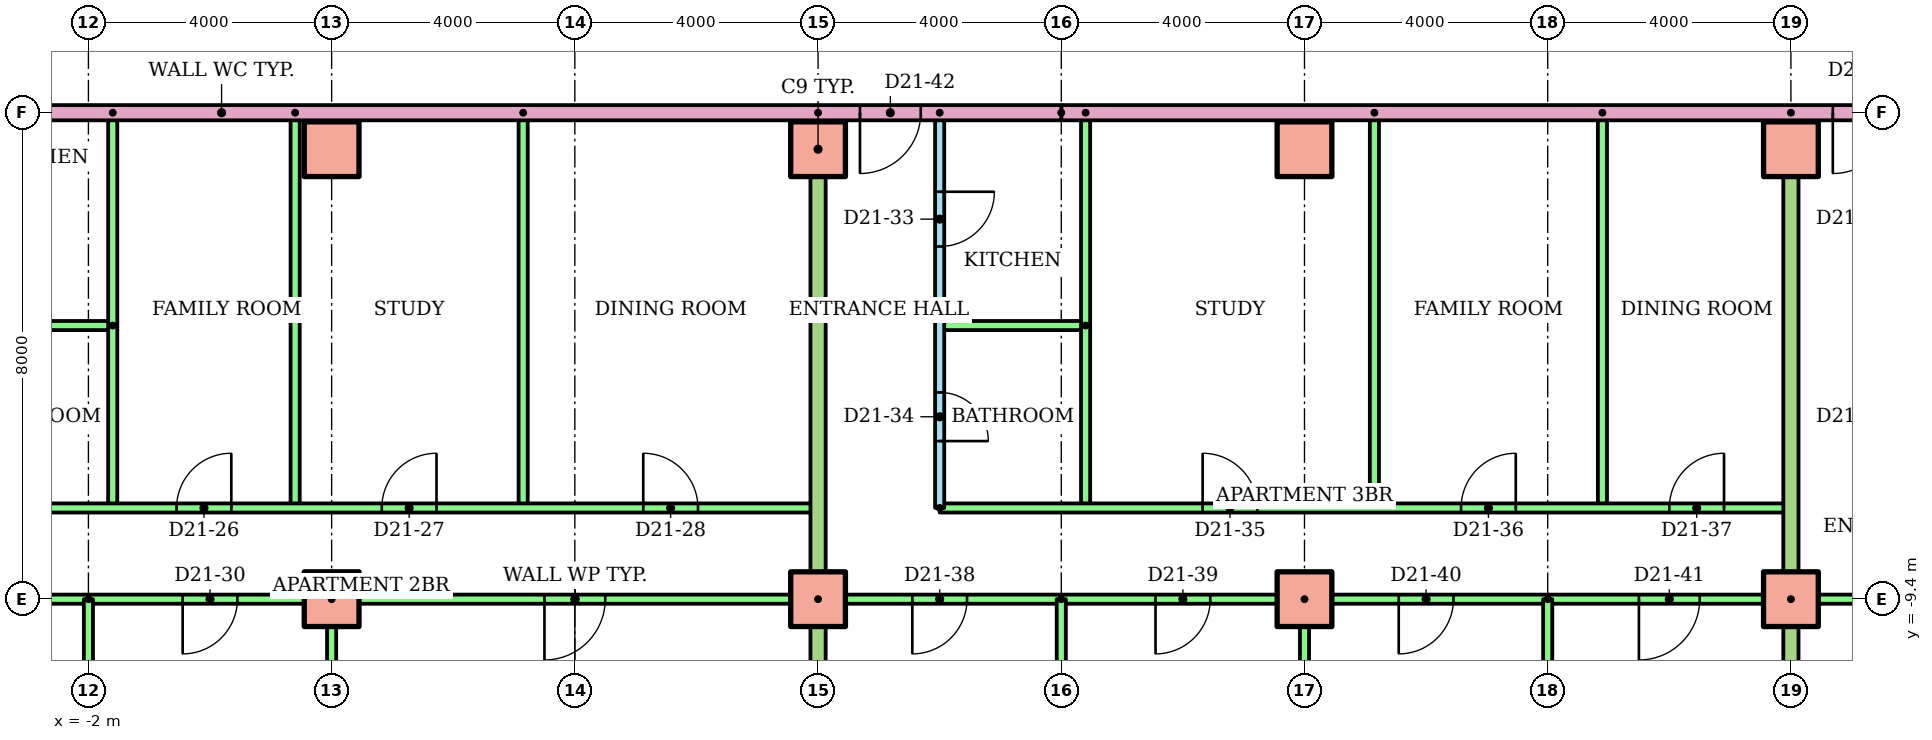
"""IFC4 building model, lengths in metres.
Left out: names, types, materials, properties, quantities, classifications, styles, units other than length and angle.
Written with IfcOpenShell. Run it as: python <this file> out.ifc"""

import sys

from ifc_helpers import new_model, si_unit, direction, frame, frame_2d, origin, origin_2d, place, context, subcontext, project, spatial, rectangle, extrude, element, fill, save


model = new_model("IFC4")
c1 = context("Model", 3, precision=1e-05, world=origin(), true_north=direction((0.0, 1.0)))
c2 = subcontext(c1, "Body", "Model", "MODEL_VIEW")
j1 = project(units=[si_unit("LENGTHUNIT", "METRE"), si_unit("PLANEANGLEUNIT", "RADIAN")], contexts=[c1])
p1 = place(None, origin())
s1 = spatial("IfcSite", under=j1, at=p1, CompositionType="ELEMENT")
p2 = place(p1, origin())
s2 = spatial("IfcBuilding", under=s1, at=p2, CompositionType="ELEMENT")
p3 = place(p2, frame((0.0, 0.0, 83.9)))
s3 = spatial("IfcBuildingStorey", under=s2, at=p3, CompositionType="ELEMENT", Elevation=83.9)
for number, where in (
    (1, (2.0, -9.4, 0.0)),
    (2, (10.0, -9.4, 0.0)),
    (3, (18.0, -9.4, 0.0)),
    (4, (26.0, -9.4, 0.0)),
    (5, (2.0, -2.0, 0.0)),
    (6, (10.0, -2.0, 0.0)),
    (7, (18.0, -2.0, 0.0)),
    (8, (26.0, -2.0, 0.0)),
):
    element("IfcColumn", number, at=place(p3, frame(where)), inside=s3, PredefinedType="COLUMN", context=c2, shape_type="SweptSolid", body=[
        extrude(rectangle(XDim=0.9, YDim=0.9, at=origin_2d()), origin(), (0.0, 0.0, 1.0), 3.2),
    ])
p4 = place(p3, frame((-1.6, -4.9, 0.0), z_axis=(0.0, 0.0, 1.0), x_axis=(-1.0, 0.0, 0.0)))
e9 = element("IfcWall", 9, at=p4, inside=s3, PredefinedType="PARTITIONING", context=c2, shape_type="SweptSolid", body=[
    extrude(rectangle(XDim=2.4, YDim=0.15, at=frame_2d((1.2, 0.0))), origin(), (0.0, 0.0, 1.0), 2.4),
])
for number, where, z_axis, x_axis in (
    (10, (-1.6, -1.4, 0.0), (0.0, 0.0, 1.0), (0.0, -1.0, 0.0)),
    (11, (1.4, -1.4, 0.0), (0.0, 0.0, 1.0), (0.0, -1.0, 0.0)),
    (12, (5.15, -1.4, 0.0), (0.0, 0.0, 1.0), (0.0, -1.0, 0.0)),
):
    element("IfcWall", number, at=place(p3, frame(where, z_axis=z_axis, x_axis=x_axis)), inside=s3, PredefinedType="PARTITIONING", context=c2, shape_type="SweptSolid", body=[
        extrude(rectangle(XDim=6.5, YDim=0.15, at=frame_2d((3.25, 0.0))), origin(), (0.0, 0.0, 1.0), 2.4),
    ])
p5 = place(p3, frame((-4.0, -7.9, 0.0)))
e13 = element("IfcWall", 13, at=p5, inside=s3, PredefinedType="PARTITIONING", context=c2, shape_type="SweptSolid", body=[
    extrude(rectangle(XDim=14.0, YDim=0.15, at=frame_2d((7.0, 0.0))), origin(), (0.0, 0.0, 1.0), 2.4),
])
p6 = place(p5, frame((3.45, 0.0, 0.0)))
e14 = element("IfcOpeningElement", 14, at=p6, cuts=e13, PredefinedType="OPENING", context=c2, shape_type="SweptSolid", body=[
    extrude(rectangle(XDim=0.9, YDim=2.1, at=frame_2d((0.45, 1.05))), frame((0.0, 0.085, 0.0), z_axis=(0.0, -1.0, 0.0), x_axis=(1.0, 0.0, 0.0)), (0.0, 0.0, 1.0), 0.17),
])
p7 = place(p5, frame((6.825, 0.0, 0.0)))
e15 = element("IfcOpeningElement", 15, at=p7, cuts=e13, PredefinedType="OPENING", context=c2, shape_type="SweptSolid", body=[
    extrude(rectangle(XDim=0.9, YDim=2.1, at=frame_2d((0.45, 1.05))), frame((0.0, 0.085, 0.0), z_axis=(0.0, -1.0, 0.0), x_axis=(1.0, 0.0, 0.0)), (0.0, 0.0, 1.0), 0.17),
])
p8 = place(p5, frame((11.125, 0.0, 0.0)))
e16 = element("IfcOpeningElement", 16, at=p8, cuts=e13, PredefinedType="OPENING", context=c2, shape_type="SweptSolid", body=[
    extrude(rectangle(XDim=0.9, YDim=2.1, at=frame_2d((0.45, 1.05))), frame((0.0, 0.085, 0.0), z_axis=(0.0, -1.0, 0.0), x_axis=(1.0, 0.0, 0.0)), (0.0, 0.0, 1.0), 0.17),
])
p9 = place(p3, frame((10.0, -9.4, 0.0), z_axis=(0.0, 0.0, 1.0), x_axis=(-1.0, 0.0, 0.0)))
e17 = element("IfcWall", 17, at=p9, inside=s3, PredefinedType="PARTITIONING", context=c2, shape_type="SweptSolid", body=[
    extrude(rectangle(XDim=16.0, YDim=0.15, at=frame_2d((8.0, 0.0))), origin(), (0.0, 0.0, 1.0), 2.4),
])
p10 = place(p9, frame((13.55, 0.0, 0.0)))
e18 = element("IfcOpeningElement", 18, at=p10, cuts=e17, PredefinedType="OPENING", context=c2, shape_type="SweptSolid", body=[
    extrude(rectangle(XDim=0.9, YDim=2.1, at=frame_2d((0.45, 1.05))), frame((0.0, 0.085, 0.0), z_axis=(0.0, -1.0, 0.0), x_axis=(1.0, 0.0, 0.0)), (0.0, 0.0, 1.0), 0.17),
])
p11 = place(p9, frame((9.55, 0.0, 0.0)))
e19 = element("IfcOpeningElement", 19, at=p11, cuts=e17, PredefinedType="OPENING", context=c2, shape_type="SweptSolid", body=[
    extrude(rectangle(XDim=0.9, YDim=2.1, at=frame_2d((0.45, 1.05))), frame((0.0, 0.085, 0.0), z_axis=(0.0, -1.0, 0.0), x_axis=(1.0, 0.0, 0.0)), (0.0, 0.0, 1.0), 0.17),
])
p12 = place(p9, frame((3.5, 0.0, 0.0)))
e20 = element("IfcOpeningElement", 20, at=p12, cuts=e17, PredefinedType="OPENING", context=c2, shape_type="SweptSolid", body=[
    extrude(rectangle(XDim=1.0, YDim=2.1, at=frame_2d((0.5, 1.05))), frame((0.0, 0.085, 0.0), z_axis=(0.0, -1.0, 0.0), x_axis=(1.0, 0.0, 0.0)), (0.0, 0.0, 1.0), 0.17),
])
p13 = place(p3, frame((-2.0, -9.4, 0.0), z_axis=(0.0, 0.0, 1.0), x_axis=(0.0, -1.0, 0.0)))
e21 = element("IfcWall", 21, at=p13, inside=s3, PredefinedType="PARTITIONING", context=c2, shape_type="SweptSolid", body=[
    extrude(rectangle(XDim=6.821, YDim=0.15, at=frame_2d((3.411, 0.0))), origin(), (0.0, 0.0, 1.0), 2.4),
])
p14 = place(p3, frame((2.0, -9.4, 0.0), z_axis=(0.0, 0.0, 1.0), x_axis=(0.0, -1.0, 0.0)))
e22 = element("IfcWall", 22, at=p14, inside=s3, PredefinedType="PARTITIONING", context=c2, shape_type="SweptSolid", body=[
    extrude(rectangle(XDim=6.81, YDim=0.15, at=frame_2d((3.405, 0.0))), origin(), (0.0, 0.0, 1.0), 2.4),
])
p15 = place(p3, frame((12.0, -1.4, 0.0), z_axis=(0.0, 0.0, 1.0), x_axis=(0.0, -1.0, 0.0)))
e23 = element("IfcWall", 23, at=p15, inside=s3, PredefinedType="PARTITIONING", context=c2, shape_type="SweptSolid", body=[
    extrude(rectangle(XDim=6.5, YDim=0.15, at=frame_2d((3.25, 0.0))), origin(), (0.0, 0.0, 1.0), 2.4),
])
p16 = place(p15, frame((1.3, 0.0, 0.0)))
e24 = element("IfcOpeningElement", 24, at=p16, cuts=e23, PredefinedType="OPENING", context=c2, shape_type="SweptSolid", body=[
    extrude(rectangle(XDim=0.9, YDim=2.1, at=frame_2d((0.45, 1.05))), frame((0.0, 0.085, 0.0), z_axis=(0.0, -1.0, 0.0), x_axis=(1.0, 0.0, 0.0)), (0.0, 0.0, 1.0), 0.17),
])
p17 = place(p15, frame((4.6, 0.0, 0.0)))
e25 = element("IfcOpeningElement", 25, at=p17, cuts=e23, PredefinedType="OPENING", context=c2, shape_type="SweptSolid", body=[
    extrude(rectangle(XDim=0.8, YDim=2.1, at=frame_2d((0.4, 1.05))), frame((0.0, 0.085, 0.0), z_axis=(0.0, -1.0, 0.0), x_axis=(1.0, 0.0, 0.0)), (0.0, 0.0, 1.0), 0.17),
])
p18 = place(p3, frame((14.4, -4.9, 0.0), z_axis=(0.0, 0.0, 1.0), x_axis=(-1.0, 0.0, 0.0)))
e26 = element("IfcWall", 26, at=p18, inside=s3, PredefinedType="PARTITIONING", context=c2, shape_type="SweptSolid", body=[
    extrude(rectangle(XDim=2.4, YDim=0.15, at=frame_2d((1.2, 0.0))), origin(), (0.0, 0.0, 1.0), 2.4),
])
for number, where, z_axis, x_axis in (
    (27, (14.4, -1.4, 0.0), (0.0, 0.0, 1.0), (0.0, -1.0, 0.0)),
    (28, (19.15, -1.4, 0.0), (0.0, 0.0, 1.0), (0.0, -1.0, 0.0)),
    (29, (22.9, -1.4, 0.0), (0.0, 0.0, 1.0), (0.0, -1.0, 0.0)),
):
    element("IfcWall", number, at=place(p3, frame(where, z_axis=z_axis, x_axis=x_axis)), inside=s3, PredefinedType="PARTITIONING", context=c2, shape_type="SweptSolid", body=[
        extrude(rectangle(XDim=6.5, YDim=0.15, at=frame_2d((3.25, 0.0))), origin(), (0.0, 0.0, 1.0), 2.4),
    ])
p19 = place(p3, frame((12.0, -7.9, 0.0)))
e30 = element("IfcWall", 30, at=p19, inside=s3, PredefinedType="PARTITIONING", context=c2, shape_type="SweptSolid", body=[
    extrude(rectangle(XDim=14.0, YDim=0.15, at=frame_2d((7.0, 0.0))), origin(), (0.0, 0.0, 1.0), 2.4),
])
p20 = place(p19, frame((4.325, 0.0, 0.0)))
e31 = element("IfcOpeningElement", 31, at=p20, cuts=e30, PredefinedType="OPENING", context=c2, shape_type="SweptSolid", body=[
    extrude(rectangle(XDim=0.9, YDim=2.1, at=frame_2d((0.45, 1.05))), frame((0.0, 0.085, 0.0), z_axis=(0.0, -1.0, 0.0), x_axis=(1.0, 0.0, 0.0)), (0.0, 0.0, 1.0), 0.17),
])
p21 = place(p19, frame((8.575, 0.0, 0.0)))
e32 = element("IfcOpeningElement", 32, at=p21, cuts=e30, PredefinedType="OPENING", context=c2, shape_type="SweptSolid", body=[
    extrude(rectangle(XDim=0.9, YDim=2.1, at=frame_2d((0.45, 1.05))), frame((0.0, 0.085, 0.0), z_axis=(0.0, -1.0, 0.0), x_axis=(1.0, 0.0, 0.0)), (0.0, 0.0, 1.0), 0.17),
])
p22 = place(p19, frame((12.0, 0.0, 0.0)))
e33 = element("IfcOpeningElement", 33, at=p22, cuts=e30, PredefinedType="OPENING", context=c2, shape_type="SweptSolid", body=[
    extrude(rectangle(XDim=0.9, YDim=2.1, at=frame_2d((0.45, 1.05))), frame((0.0, 0.085, 0.0), z_axis=(0.0, -1.0, 0.0), x_axis=(1.0, 0.0, 0.0)), (0.0, 0.0, 1.0), 0.17),
])
p23 = place(p3, frame((26.0, -9.4, 0.0), z_axis=(0.0, 0.0, 1.0), x_axis=(-1.0, 0.0, 0.0)))
e34 = element("IfcWall", 34, at=p23, inside=s3, PredefinedType="PARTITIONING", context=c2, shape_type="SweptSolid", body=[
    extrude(rectangle(XDim=16.0, YDim=0.15, at=frame_2d((8.0, 0.0))), origin(), (0.0, 0.0, 1.0), 2.4),
])
p24 = place(p23, frame((13.55, 0.0, 0.0)))
e35 = element("IfcOpeningElement", 35, at=p24, cuts=e34, PredefinedType="OPENING", context=c2, shape_type="SweptSolid", body=[
    extrude(rectangle(XDim=0.9, YDim=2.1, at=frame_2d((0.45, 1.05))), frame((0.0, 0.085, 0.0), z_axis=(0.0, -1.0, 0.0), x_axis=(1.0, 0.0, 0.0)), (0.0, 0.0, 1.0), 0.17),
])
p25 = place(p23, frame((9.55, 0.0, 0.0)))
e36 = element("IfcOpeningElement", 36, at=p25, cuts=e34, PredefinedType="OPENING", context=c2, shape_type="SweptSolid", body=[
    extrude(rectangle(XDim=0.9, YDim=2.1, at=frame_2d((0.45, 1.05))), frame((0.0, 0.085, 0.0), z_axis=(0.0, -1.0, 0.0), x_axis=(1.0, 0.0, 0.0)), (0.0, 0.0, 1.0), 0.17),
])
p26 = place(p23, frame((5.55, 0.0, 0.0)))
e37 = element("IfcOpeningElement", 37, at=p26, cuts=e34, PredefinedType="OPENING", context=c2, shape_type="SweptSolid", body=[
    extrude(rectangle(XDim=0.9, YDim=2.1, at=frame_2d((0.45, 1.05))), frame((0.0, 0.085, 0.0), z_axis=(0.0, -1.0, 0.0), x_axis=(1.0, 0.0, 0.0)), (0.0, 0.0, 1.0), 0.17),
])
p27 = place(p23, frame((1.5, 0.0, 0.0)))
e38 = element("IfcOpeningElement", 38, at=p27, cuts=e34, PredefinedType="OPENING", context=c2, shape_type="SweptSolid", body=[
    extrude(rectangle(XDim=1.0, YDim=2.1, at=frame_2d((0.5, 1.05))), frame((0.0, 0.085, 0.0), z_axis=(0.0, -1.0, 0.0), x_axis=(1.0, 0.0, 0.0)), (0.0, 0.0, 1.0), 0.17),
])
p28 = place(p3, frame((14.0, -9.4, 0.0), z_axis=(0.0, 0.0, 1.0), x_axis=(0.0, -1.0, 0.0)))
e39 = element("IfcWall", 39, at=p28, inside=s3, PredefinedType="PARTITIONING", context=c2, shape_type="SweptSolid", body=[
    extrude(rectangle(XDim=6.821, YDim=0.15, at=frame_2d((3.411, 0.0))), origin(), (0.0, 0.0, 1.0), 2.4),
])
p29 = place(p3, frame((18.0, -9.4, 0.0), z_axis=(0.0, 0.0, 1.0), x_axis=(0.0, -1.0, 0.0)))
e40 = element("IfcWall", 40, at=p29, inside=s3, PredefinedType="PARTITIONING", context=c2, shape_type="SweptSolid", body=[
    extrude(rectangle(XDim=6.81, YDim=0.15, at=frame_2d((3.405, 0.0))), origin(), (0.0, 0.0, 1.0), 2.4),
])
p30 = place(p3, frame((22.0, -9.4, 0.0), z_axis=(0.0, 0.0, 1.0), x_axis=(0.0, -1.0, 0.0)))
e41 = element("IfcWall", 41, at=p30, inside=s3, PredefinedType="PARTITIONING", context=c2, shape_type="SweptSolid", body=[
    extrude(rectangle(XDim=6.821, YDim=0.15, at=frame_2d((3.411, 0.0))), origin(), (0.0, 0.0, 1.0), 2.4),
])
p31 = place(p3, frame((10.0, -1.4, 0.0), z_axis=(0.0, 0.0, 1.0), x_axis=(0.0, -1.0, 0.0)))
e42 = element("IfcWall", 42, at=p31, inside=s3, PredefinedType="PARTITIONING", context=c2, shape_type="SweptSolid", body=[
    extrude(rectangle(XDim=14.81, YDim=0.25, at=frame_2d((7.405, 0.0))), origin(), (0.0, 0.0, 1.0), 2.4),
])
p32 = place(p3, frame((40.62, -9.4, 0.0), z_axis=(0.0, 0.0, 1.0), x_axis=(-1.0, 0.0, 0.0)))
e43 = element("IfcWall", 43, at=p32, inside=s3, PredefinedType="PARTITIONING", context=c2, shape_type="SweptSolid", body=[
    extrude(rectangle(XDim=14.62, YDim=0.15, at=frame_2d((7.31, 0.0))), origin(), (0.0, 0.0, 1.0), 2.4),
])
p33 = place(p32, frame((10.12, 0.0, 0.0)))
e44 = element("IfcOpeningElement", 44, at=p33, cuts=e43, PredefinedType="OPENING", context=c2, shape_type="SweptSolid", body=[
    extrude(rectangle(XDim=1.0, YDim=2.1, at=frame_2d((0.5, 1.05))), frame((0.0, 0.085, 0.0), z_axis=(0.0, -1.0, 0.0), x_axis=(1.0, 0.0, 0.0)), (0.0, 0.0, 1.0), 0.17),
])
p34 = place(p32, frame((2.97, 0.0, 0.0)))
e45 = element("IfcOpeningElement", 45, at=p34, cuts=e43, PredefinedType="OPENING", context=c2, shape_type="SweptSolid", body=[
    extrude(rectangle(XDim=0.9, YDim=2.1, at=frame_2d((0.45, 1.05))), frame((0.0, 0.085, 0.0), z_axis=(0.0, -1.0, 0.0), x_axis=(1.0, 0.0, 0.0)), (0.0, 0.0, 1.0), 0.17),
])
p35 = place(p3, frame((26.0, -1.4, 0.0), z_axis=(0.0, 0.0, 1.0), x_axis=(0.0, -1.0, 0.0)))
e46 = element("IfcWall", 46, at=p35, inside=s3, PredefinedType="PARTITIONING", context=c2, shape_type="SweptSolid", body=[
    extrude(rectangle(XDim=14.81, YDim=0.25, at=frame_2d((7.405, 0.0))), origin(), (0.0, 0.0, 1.0), 2.4),
])
p36 = place(p3, frame((29.0, -1.4, 0.0), z_axis=(0.0, 0.0, 1.0), x_axis=(-1.0, 0.0, 0.0)))
e47 = element("IfcWall", 47, at=p36, inside=s3, PredefinedType="PARTITIONING", context=c2, shape_type="SweptSolid", body=[
    extrude(rectangle(XDim=15.0, YDim=0.25, at=frame_2d((7.5, 0.0))), origin(), (0.0, 0.0, 1.0), 2.4),
])
p37 = place(p36, frame((1.311, 0.0, 0.0)))
e48 = element("IfcOpeningElement", 48, at=p37, cuts=e47, PredefinedType="OPENING", context=c2, shape_type="SweptSolid", body=[
    extrude(rectangle(XDim=1.0, YDim=2.1, at=frame_2d((0.5, 1.05))), frame((0.0, 0.135, 0.0), z_axis=(0.0, -1.0, 0.0), x_axis=(1.0, 0.0, 0.0)), (0.0, 0.0, 1.0), 0.27),
])
p38 = place(p3, frame((14.0, -1.4, 0.0), z_axis=(0.0, 0.0, 1.0), x_axis=(-1.0, 0.0, 0.0)))
e49 = element("IfcWall", 49, at=p38, inside=s3, PredefinedType="PARTITIONING", context=c2, shape_type="SweptSolid", body=[
    extrude(rectangle(XDim=28.0, YDim=0.25, at=frame_2d((14.0, 0.0))), origin(), (0.0, 0.0, 1.0), 2.4),
])
p39 = place(p38, frame((20.689, 0.0, 0.0)))
e50 = element("IfcOpeningElement", 50, at=p39, cuts=e49, PredefinedType="OPENING", context=c2, shape_type="SweptSolid", body=[
    extrude(rectangle(XDim=1.0, YDim=2.1, at=frame_2d((0.5, 1.05))), frame((0.0, 0.135, 0.0), z_axis=(0.0, -1.0, 0.0), x_axis=(1.0, 0.0, 0.0)), (0.0, 0.0, 1.0), 0.27),
])
p40 = place(p38, frame((18.311, 0.0, 0.0)))
e51 = element("IfcOpeningElement", 51, at=p40, cuts=e49, PredefinedType="OPENING", context=c2, shape_type="SweptSolid", body=[
    extrude(rectangle(XDim=1.0, YDim=2.1, at=frame_2d((0.5, 1.05))), frame((0.0, 0.135, 0.0), z_axis=(0.0, -1.0, 0.0), x_axis=(1.0, 0.0, 0.0)), (0.0, 0.0, 1.0), 0.27),
])
p41 = place(p38, frame((2.311, 0.0, 0.0)))
e52 = element("IfcOpeningElement", 52, at=p41, cuts=e49, PredefinedType="OPENING", context=c2, shape_type="SweptSolid", body=[
    extrude(rectangle(XDim=1.0, YDim=2.1, at=frame_2d((0.5, 1.05))), frame((0.0, 0.135, 0.0), z_axis=(0.0, -1.0, 0.0), x_axis=(1.0, 0.0, 0.0)), (0.0, 0.0, 1.0), 0.27),
])
p42 = place(p6, origin())
e53 = element("IfcDoor", 53, at=p42, inside=s3, OperationType="SINGLE_SWING_RIGHT", PredefinedType="DOOR", context=c2, shape_type="SweptSolid", body=[
    extrude(rectangle(XDim=0.9, YDim=2.1, at=frame_2d((0.45, 1.05))), frame((0.0, 0.025, 0.0), z_axis=(0.0, -1.0, 0.0), x_axis=(1.0, 0.0, 0.0)), (0.0, 0.0, 1.0), 0.05),
])
fill(e14, e53)
p43 = place(p7, origin())
e54 = element("IfcDoor", 54, at=p43, inside=s3, OperationType="SINGLE_SWING_RIGHT", PredefinedType="DOOR", context=c2, shape_type="SweptSolid", body=[
    extrude(rectangle(XDim=0.9, YDim=2.1, at=frame_2d((0.45, 1.05))), frame((0.0, 0.025, 0.0), z_axis=(0.0, -1.0, 0.0), x_axis=(1.0, 0.0, 0.0)), (0.0, 0.0, 1.0), 0.05),
])
fill(e15, e54)
p44 = place(p8, origin())
e55 = element("IfcDoor", 55, at=p44, inside=s3, OperationType="SINGLE_SWING_LEFT", PredefinedType="DOOR", context=c2, shape_type="SweptSolid", body=[
    extrude(rectangle(XDim=0.9, YDim=2.1, at=frame_2d((0.45, 1.05))), frame((0.0, 0.025, 0.0), z_axis=(0.0, -1.0, 0.0), x_axis=(1.0, 0.0, 0.0)), (0.0, 0.0, 1.0), 0.05),
])
fill(e16, e55)
p45 = place(p11, origin())
e56 = element("IfcDoor", 56, at=p45, inside=s3, OperationType="SINGLE_SWING_RIGHT", PredefinedType="DOOR", context=c2, shape_type="SweptSolid", body=[
    extrude(rectangle(XDim=0.9, YDim=2.1, at=frame_2d((0.45, 1.05))), frame((0.0, 0.025, 0.0), z_axis=(0.0, -1.0, 0.0), x_axis=(1.0, 0.0, 0.0)), (0.0, 0.0, 1.0), 0.05),
])
fill(e19, e56)
p46 = place(p12, origin())
e57 = element("IfcDoor", 57, at=p46, inside=s3, OperationType="SINGLE_SWING_RIGHT", PredefinedType="DOOR", context=c2, shape_type="SweptSolid", body=[
    extrude(rectangle(XDim=1.0, YDim=2.1, at=frame_2d((0.5, 1.05))), frame((0.0, 0.025, 0.0), z_axis=(0.0, -1.0, 0.0), x_axis=(1.0, 0.0, 0.0)), (0.0, 0.0, 1.0), 0.05),
])
fill(e20, e57)
p47 = place(p16, origin())
e58 = element("IfcDoor", 58, at=p47, inside=s3, OperationType="SINGLE_SWING_LEFT", PredefinedType="DOOR", context=c2, shape_type="SweptSolid", body=[
    extrude(rectangle(XDim=0.9, YDim=2.1, at=frame_2d((0.45, 1.05))), frame((0.0, 0.025, 0.0), z_axis=(0.0, -1.0, 0.0), x_axis=(1.0, 0.0, 0.0)), (0.0, 0.0, 1.0), 0.05),
])
fill(e24, e58)
p48 = place(p17, origin())
e59 = element("IfcDoor", 59, at=p48, inside=s3, OperationType="SINGLE_SWING_RIGHT", PredefinedType="DOOR", context=c2, shape_type="SweptSolid", body=[
    extrude(rectangle(XDim=0.8, YDim=2.1, at=frame_2d((0.4, 1.05))), frame((0.0, 0.025, 0.0), z_axis=(0.0, -1.0, 0.0), x_axis=(1.0, 0.0, 0.0)), (0.0, 0.0, 1.0), 0.05),
])
fill(e25, e59)
p49 = place(p20, origin())
e60 = element("IfcDoor", 60, at=p49, inside=s3, OperationType="SINGLE_SWING_LEFT", PredefinedType="DOOR", context=c2, shape_type="SweptSolid", body=[
    extrude(rectangle(XDim=0.9, YDim=2.1, at=frame_2d((0.45, 1.05))), frame((0.0, 0.025, 0.0), z_axis=(0.0, -1.0, 0.0), x_axis=(1.0, 0.0, 0.0)), (0.0, 0.0, 1.0), 0.05),
])
fill(e31, e60)
p50 = place(p21, origin())
e61 = element("IfcDoor", 61, at=p50, inside=s3, OperationType="SINGLE_SWING_RIGHT", PredefinedType="DOOR", context=c2, shape_type="SweptSolid", body=[
    extrude(rectangle(XDim=0.9, YDim=2.1, at=frame_2d((0.45, 1.05))), frame((0.0, 0.025, 0.0), z_axis=(0.0, -1.0, 0.0), x_axis=(1.0, 0.0, 0.0)), (0.0, 0.0, 1.0), 0.05),
])
fill(e32, e61)
p51 = place(p22, origin())
e62 = element("IfcDoor", 62, at=p51, inside=s3, OperationType="SINGLE_SWING_RIGHT", PredefinedType="DOOR", context=c2, shape_type="SweptSolid", body=[
    extrude(rectangle(XDim=0.9, YDim=2.1, at=frame_2d((0.45, 1.05))), frame((0.0, 0.025, 0.0), z_axis=(0.0, -1.0, 0.0), x_axis=(1.0, 0.0, 0.0)), (0.0, 0.0, 1.0), 0.05),
])
fill(e33, e62)
p52 = place(p24, origin())
e63 = element("IfcDoor", 63, at=p52, inside=s3, OperationType="SINGLE_SWING_RIGHT", PredefinedType="DOOR", context=c2, shape_type="SweptSolid", body=[
    extrude(rectangle(XDim=0.9, YDim=2.1, at=frame_2d((0.45, 1.05))), frame((0.0, 0.025, 0.0), z_axis=(0.0, -1.0, 0.0), x_axis=(1.0, 0.0, 0.0)), (0.0, 0.0, 1.0), 0.05),
])
fill(e35, e63)
p53 = place(p25, origin())
e64 = element("IfcDoor", 64, at=p53, inside=s3, OperationType="SINGLE_SWING_RIGHT", PredefinedType="DOOR", context=c2, shape_type="SweptSolid", body=[
    extrude(rectangle(XDim=0.9, YDim=2.1, at=frame_2d((0.45, 1.05))), frame((0.0, 0.025, 0.0), z_axis=(0.0, -1.0, 0.0), x_axis=(1.0, 0.0, 0.0)), (0.0, 0.0, 1.0), 0.05),
])
fill(e36, e64)
p54 = place(p26, origin())
e65 = element("IfcDoor", 65, at=p54, inside=s3, OperationType="SINGLE_SWING_RIGHT", PredefinedType="DOOR", context=c2, shape_type="SweptSolid", body=[
    extrude(rectangle(XDim=0.9, YDim=2.1, at=frame_2d((0.45, 1.05))), frame((0.0, 0.025, 0.0), z_axis=(0.0, -1.0, 0.0), x_axis=(1.0, 0.0, 0.0)), (0.0, 0.0, 1.0), 0.05),
])
fill(e37, e65)
p55 = place(p27, origin())
e66 = element("IfcDoor", 66, at=p55, inside=s3, OperationType="SINGLE_SWING_RIGHT", PredefinedType="DOOR", context=c2, shape_type="SweptSolid", body=[
    extrude(rectangle(XDim=1.0, YDim=2.1, at=frame_2d((0.5, 1.05))), frame((0.0, 0.025, 0.0), z_axis=(0.0, -1.0, 0.0), x_axis=(1.0, 0.0, 0.0)), (0.0, 0.0, 1.0), 0.05),
])
fill(e38, e66)
p56 = place(p41, origin())
e67 = element("IfcDoor", 67, at=p56, inside=s3, OperationType="SINGLE_SWING_RIGHT", PredefinedType="DOOR", context=c2, shape_type="SweptSolid", body=[
    extrude(rectangle(XDim=1.0, YDim=2.1, at=frame_2d((0.5, 1.05))), frame((0.0, 0.025, 0.0), z_axis=(0.0, -1.0, 0.0), x_axis=(1.0, 0.0, 0.0)), (0.0, 0.0, 1.0), 0.05),
])
fill(e52, e67)
p57 = place(p37, origin())
e68 = element("IfcDoor", 68, at=p57, inside=s3, OperationType="SINGLE_SWING_RIGHT", PredefinedType="DOOR", context=c2, shape_type="SweptSolid", body=[
    extrude(rectangle(XDim=1.0, YDim=2.1, at=frame_2d((0.5, 1.05))), frame((0.0, 0.025, 0.0), z_axis=(0.0, -1.0, 0.0), x_axis=(1.0, 0.0, 0.0)), (0.0, 0.0, 1.0), 0.05),
])
fill(e48, e68)
save(model, sys.argv[1])
